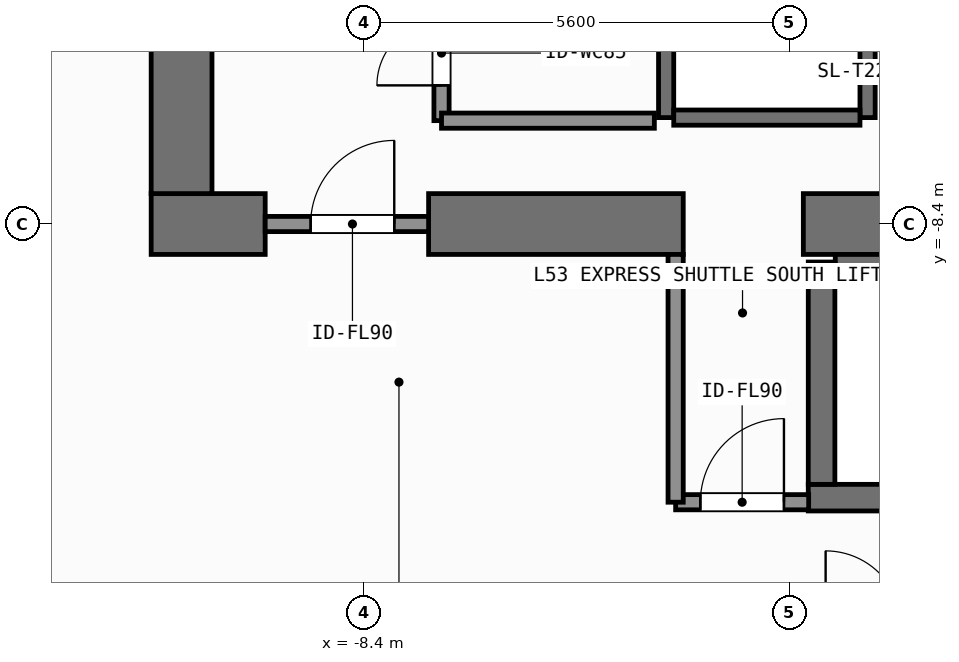
"""IFC4 building model, lengths in metres.
Left out: names, types, materials, properties, quantities, classifications, styles, units other than length and angle.
Written with IfcOpenShell. Run it as: python <this file> out.ifc"""

import sys

from ifc_helpers import new_model, si_unit, direction, frame, frame_2d, origin, place, context, subcontext, project, spatial, rectangle, extrude, element, fill, save


model = new_model("IFC4")
c1 = context("Model", 3, precision=1e-05, world=origin(), true_north=direction((0.0, 1.0)))
c2 = subcontext(c1, "Body", "Model", "MODEL_VIEW")
j1 = project(units=[si_unit("LENGTHUNIT", "METRE"), si_unit("PLANEANGLEUNIT", "RADIAN")], contexts=[c1])
p1 = place(None, origin())
s1 = spatial("IfcSite", under=j1, at=p1, CompositionType="ELEMENT")
p2 = place(p1, origin())
s2 = spatial("IfcBuilding", under=s1, at=p2, CompositionType="ELEMENT")
p3 = place(p2, frame((0.0, 0.0, 215.7)))
s3 = spatial("IfcBuildingStorey", under=s2, at=p3, CompositionType="ELEMENT", Elevation=215.7)
p4 = place(p3, frame((-11.2, -8.4, 0.0), z_axis=(0.0, 0.0, 1.0), x_axis=(1.0, 0.0, 0.0)))
e1 = element("IfcWall", 1, at=p4, inside=s3, PredefinedType="SHEAR", context=c2, shape_type="SweptSolid", body=[
    extrude(rectangle(XDim=1.5, YDim=0.8, at=frame_2d((0.75, 0.0))), origin(), (0.0, 0.0, 1.0), 3.9),
])
p5 = place(p3, frame((-7.55, -8.4, 0.0), z_axis=(0.0, 0.0, 1.0), x_axis=(1.0, 0.0, 0.0)))
e2 = element("IfcWall", 2, at=p5, inside=s3, PredefinedType="SHEAR", context=c2, shape_type="SweptSolid", body=[
    extrude(rectangle(XDim=3.35, YDim=0.8, at=frame_2d((1.675, 0.0))), origin(), (0.0, 0.0, 1.0), 3.9),
])
p6 = place(p3, frame((-2.62, -8.4, 0.0), z_axis=(0.0, 0.0, 1.0), x_axis=(1.0, 0.0, 0.0)))
e3 = element("IfcWall", 3, at=p6, inside=s3, PredefinedType="SHEAR", context=c2, shape_type="SweptSolid", body=[
    extrude(rectangle(XDim=7.27, YDim=0.8, at=frame_2d((3.635, 0.0))), origin(), (0.0, 0.0, 1.0), 3.9),
])
p7 = place(p3, frame((-10.8, -8.0, 0.0), z_axis=(0.0, 0.0, 1.0), x_axis=(0.0, 1.0, 0.0)))
e4 = element("IfcWall", 4, at=p7, inside=s3, PredefinedType="SHEAR", context=c2, shape_type="SweptSolid", body=[
    extrude(rectangle(XDim=16.0, YDim=0.8, at=frame_2d((8.0, 0.0))), origin(), (0.0, 0.0, 1.0), 3.9),
])
p8 = place(p3, frame((-2.555, -12.0, 0.0), z_axis=(0.0, 0.0, 1.0), x_axis=(1.0, 0.0, 0.0)))
e5 = element("IfcWall", 5, at=p8, inside=s3, PredefinedType="SHEAR", context=c2, shape_type="SweptSolid", body=[
    extrude(rectangle(XDim=7.31, YDim=0.35, at=frame_2d((3.655, 0.0))), origin(), (0.0, 0.0, 1.0), 3.9),
])
p9 = place(p3, frame((-2.2, -8.913, 0.0), z_axis=(0.0, 0.0, 1.0), x_axis=(1.0, 0.0, 0.0)))
e6 = element("IfcWall", 6, at=p9, inside=s3, PredefinedType="SHEAR", context=c2, shape_type="SweptSolid", body=[
    extrude(rectangle(XDim=6.6, YDim=0.225, at=frame_2d((3.3, 0.0))), origin(), (0.0, 0.0, 1.0), 3.9),
])
p10 = place(p3, frame((-2.38, -11.825, 0.0), z_axis=(0.0, 0.0, 1.0), x_axis=(0.0, 1.0, 0.0)))
e7 = element("IfcWall", 7, at=p10, inside=s3, PredefinedType="SHEAR", context=c2, shape_type="SweptSolid", body=[
    extrude(rectangle(XDim=2.925, YDim=0.35, at=frame_2d((1.462, 0.0))), origin(), (0.0, 0.0, 1.0), 3.9),
])
for number, where, z_axis, x_axis in (
    (8, (-4.425, -7.0, 0.0), (0.0, 0.0, 1.0), (0.0, 1.0, 0.0)),
    (9, (-1.775, -7.0, 0.0), (0.0, 0.0, 1.0), (0.0, 1.0, 0.0)),
):
    element("IfcWall", number, at=place(p3, frame(where, z_axis=z_axis, x_axis=x_axis)), inside=s3, PredefinedType="SHEAR", context=c2, shape_type="SweptSolid", body=[
        extrude(rectangle(XDim=2.8, YDim=0.2, at=frame_2d((1.4, 0.0))), origin(), (0.0, 0.0, 1.0), 3.62),
    ])
p11 = place(p3, frame((-4.325, -7.0, 0.0), z_axis=(0.0, 0.0, 1.0), x_axis=(1.0, 0.0, 0.0)))
e10 = element("IfcWall", 10, at=p11, inside=s3, PredefinedType="SHEAR", context=c2, shape_type="SweptSolid", body=[
    extrude(rectangle(XDim=2.45, YDim=0.2, at=frame_2d((1.225, 0.0))), origin(), (0.0, 0.0, 1.0), 3.62),
])
p12 = place(p3, frame((-9.7, -8.4, 0.0), z_axis=(0.0, 0.0, 1.0), x_axis=(1.0, 0.0, 0.0)))
e11 = element("IfcWall", 11, at=p12, inside=s3, PredefinedType="SOLIDWALL", context=c2, shape_type="SweptSolid", body=[
    extrude(rectangle(XDim=2.15, YDim=0.2, at=frame_2d((1.075, 0.0))), origin(), (0.0, 0.0, 1.0), 2.76),
])
p13 = place(p12, frame((0.598, 0.0, 0.0)))
e12 = element("IfcOpeningElement", 12, at=p13, cuts=e11, PredefinedType="OPENING", context=c2, shape_type="SweptSolid", body=[
    extrude(rectangle(XDim=1.1, YDim=2.15, at=frame_2d((0.55, 1.075))), frame((0.0, 0.11, 0.0), z_axis=(0.0, -1.0, 0.0), x_axis=(1.0, 0.0, 0.0)), (0.0, 0.0, 1.0), 0.22),
])
p14 = place(p3, frame((-4.3, -12.06, 0.0), z_axis=(0.0, 0.0, 1.0), x_axis=(1.0, 0.0, 0.0)))
e13 = element("IfcWall", 13, at=p14, inside=s3, PredefinedType="SOLIDWALL", context=c2, shape_type="SweptSolid", body=[
    extrude(rectangle(XDim=1.75, YDim=0.2, at=frame_2d((0.875, 0.0))), origin(), (0.0, 0.0, 1.0), 3.62),
])
p15 = place(p14, frame((0.325, 0.0, 0.0)))
e14 = element("IfcOpeningElement", 14, at=p15, cuts=e13, PredefinedType="OPENING", context=c2, shape_type="SweptSolid", body=[
    extrude(rectangle(XDim=1.1, YDim=2.15, at=frame_2d((0.55, 1.075))), frame((0.0, 0.11, 0.0), z_axis=(0.0, -1.0, 0.0), x_axis=(1.0, 0.0, 0.0)), (0.0, 0.0, 1.0), 0.22),
])
p16 = place(p3, frame((-7.38, -7.04, 0.0), z_axis=(0.0, 0.0, 1.0), x_axis=(0.0, 1.0, 0.0)))
e15 = element("IfcWall", 15, at=p16, inside=s3, PredefinedType="SOLIDWALL", context=c2, shape_type="SweptSolid", body=[
    extrude(rectangle(XDim=1.93, YDim=0.2, at=frame_2d((0.965, 0.0))), origin(), (0.0, 0.0, 1.0), 3.62),
])
p17 = place(p16, frame((0.464, 0.0, 0.0)))
e16 = element("IfcOpeningElement", 16, at=p17, cuts=e15, PredefinedType="OPENING", context=c2, shape_type="SweptSolid", body=[
    extrude(rectangle(XDim=0.85, YDim=2.1, at=frame_2d((0.425, 1.05))), frame((0.0, 0.11, 0.0), z_axis=(0.0, -1.0, 0.0), x_axis=(1.0, 0.0, 0.0)), (0.0, 0.0, 1.0), 0.22),
])
p18 = place(p3, frame((-4.3, -12.06, 0.0), z_axis=(0.0, 0.0, 1.0), x_axis=(0.0, 1.0, 0.0)))
e17 = element("IfcWall", 17, at=p18, inside=s3, PredefinedType="SOLIDWALL", context=c2, shape_type="SweptSolid", body=[
    extrude(rectangle(XDim=3.26, YDim=0.2, at=frame_2d((1.63, 0.0))), origin(), (0.0, 0.0, 1.0), 3.62),
])
p19 = place(p3, frame((-7.38, -7.04, 0.0), z_axis=(0.0, 0.0, 1.0), x_axis=(1.0, 0.0, 0.0)))
e18 = element("IfcWall", 18, at=p19, inside=s3, PredefinedType="SOLIDWALL", context=c2, shape_type="SweptSolid", body=[
    extrude(rectangle(XDim=2.8, YDim=0.2, at=frame_2d((1.4, 0.0))), origin(), (0.0, 0.0, 1.0), 3.62),
])
p20 = place(p13, origin())
e19 = element("IfcDoor", 19, at=p20, inside=s3, OperationType="SINGLE_SWING_RIGHT", PredefinedType="DOOR", context=c2, shape_type="SweptSolid", body=[
    extrude(rectangle(XDim=1.1, YDim=2.15, at=frame_2d((0.55, 1.075))), frame((0.0, 0.025, 0.0), z_axis=(0.0, -1.0, 0.0), x_axis=(1.0, 0.0, 0.0)), (0.0, 0.0, 1.0), 0.05),
])
fill(e12, e19)
p21 = place(p15, origin())
e20 = element("IfcDoor", 20, at=p21, inside=s3, OperationType="SINGLE_SWING_RIGHT", PredefinedType="DOOR", context=c2, shape_type="SweptSolid", body=[
    extrude(rectangle(XDim=1.1, YDim=2.15, at=frame_2d((0.55, 1.075))), frame((0.0, 0.025, 0.0), z_axis=(0.0, -1.0, 0.0), x_axis=(1.0, 0.0, 0.0)), (0.0, 0.0, 1.0), 0.05),
])
fill(e14, e20)
p22 = place(p17, origin())
e21 = element("IfcDoor", 21, at=p22, inside=s3, OperationType="SINGLE_SWING_LEFT", PredefinedType="DOOR", context=c2, shape_type="SweptSolid", body=[
    extrude(rectangle(XDim=0.85, YDim=2.1, at=frame_2d((0.425, 1.05))), frame((0.0, 0.025, 0.0), z_axis=(0.0, -1.0, 0.0), x_axis=(1.0, 0.0, 0.0)), (0.0, 0.0, 1.0), 0.05),
])
fill(e16, e21)
save(model, sys.argv[1])
